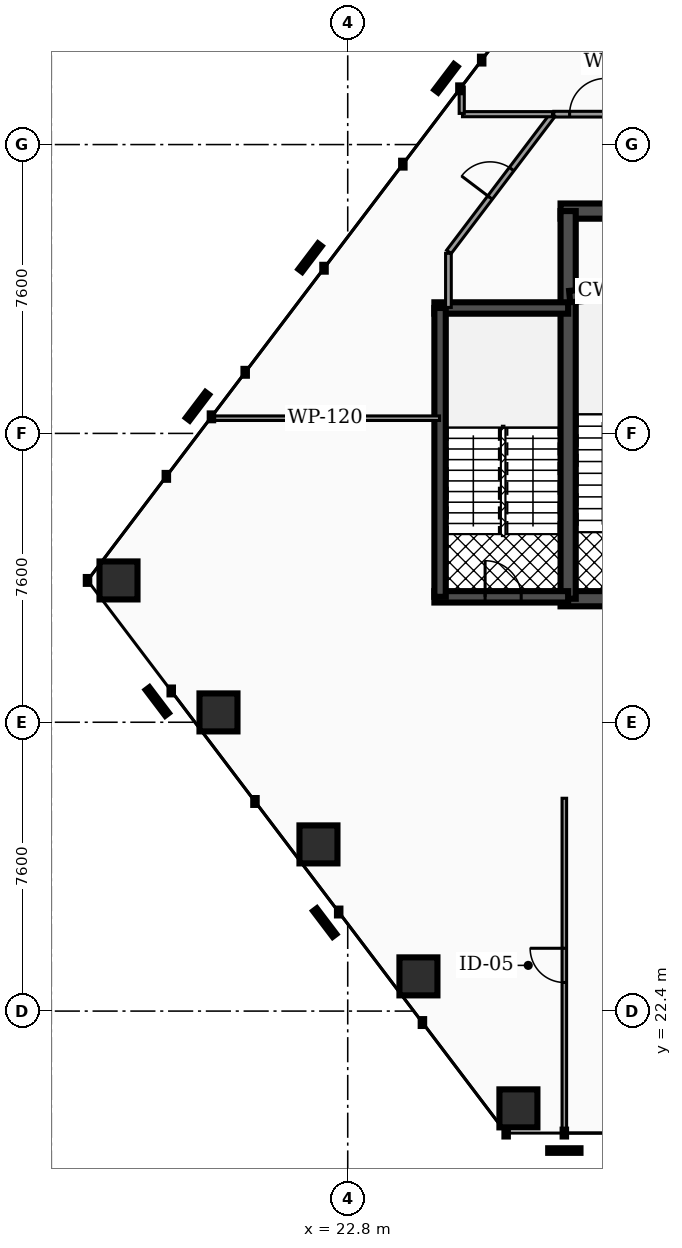
"""IFC4 building model, lengths in metres.
Left out: names, types, materials, properties, quantities, classifications, styles, units other than length and angle.
Written with IfcOpenShell. Run it as: python <this file> out.ifc"""

import sys

from ifc_helpers import new_model, si_unit, direction, frame, frame_2d, origin, origin_2d, place, context, subcontext, project, spatial, rectangle, hollow_rectangle, extrude, element, fill, save


model = new_model("IFC4")
c1 = context("Model", 3, precision=1e-05, world=origin(), true_north=direction((0.0, 1.0)))
c2 = subcontext(c1, "Body", "Model", "MODEL_VIEW")
j1 = project(units=[si_unit("LENGTHUNIT", "METRE"), si_unit("PLANEANGLEUNIT", "RADIAN")], contexts=[c1])
p1 = place(None, origin())
s1 = spatial("IfcSite", under=j1, at=p1, CompositionType="ELEMENT")
p2 = place(p1, origin())
s2 = spatial("IfcBuilding", under=s1, at=p2, CompositionType="ELEMENT")
p3 = place(p2, frame((0.0, 0.0, 27.54)))
s3 = spatial("IfcBuildingStorey", under=s2, at=p3, CompositionType="ELEMENT", Elevation=27.54)
p4 = place(p3, frame((28.4, 43.45, 0.0), z_axis=(0.0, 0.0, 1.0), x_axis=(1.0, 0.0, 0.0)))
e1 = element("IfcWall", 1, at=p4, inside=s3, PredefinedType="SHEAR", context=c2, shape_type="SweptSolid", body=[
    extrude(rectangle(XDim=20.06, YDim=0.4, at=frame_2d((10.03, 0.0))), origin(), (0.0, 0.0, 1.0), 3.82),
])
p5 = place(p3, frame((28.4, 33.25, 0.0), z_axis=(0.0, 0.0, 1.0), x_axis=(1.0, 0.0, 0.0)))
e2 = element("IfcWall", 2, at=p5, inside=s3, PredefinedType="SHEAR", context=c2, shape_type="SweptSolid", body=[
    extrude(rectangle(XDim=20.06, YDim=0.4, at=frame_2d((10.03, 0.0))), origin(), (0.0, 0.0, 1.0), 3.82),
])
p6 = place(p5, frame((4.03, 0.0, 0.0)))
e3 = element("IfcOpeningElement", 3, at=p6, cuts=e2, PredefinedType="OPENING", context=c2, shape_type="SweptSolid", body=[
    extrude(rectangle(XDim=1.1, YDim=2.15, at=frame_2d((0.55, 1.075))), frame((0.0, 0.21, 0.0), z_axis=(0.0, -1.0, 0.0), x_axis=(1.0, 0.0, 0.0)), (0.0, 0.0, 1.0), 0.42),
])
p7 = place(p5, frame((14.87, 0.0, 0.0)))
e4 = element("IfcOpeningElement", 4, at=p7, cuts=e2, PredefinedType="OPENING", context=c2, shape_type="SweptSolid", body=[
    extrude(rectangle(XDim=1.1, YDim=2.15, at=frame_2d((0.55, 1.075))), frame((0.0, 0.21, 0.0), z_axis=(0.0, -1.0, 0.0), x_axis=(1.0, 0.0, 0.0)), (0.0, 0.0, 1.0), 0.42),
])
p8 = place(p5, frame((1.31, 0.0, 0.0)))
e5 = element("IfcOpeningElement", 5, at=p8, cuts=e2, PredefinedType="OPENING", context=c2, shape_type="SweptSolid", body=[
    extrude(rectangle(XDim=1.1, YDim=2.2, at=frame_2d((0.55, 1.1))), frame((0.0, 0.21, 0.0), z_axis=(0.0, -1.0, 0.0), x_axis=(1.0, 0.0, 0.0)), (0.0, 0.0, 1.0), 0.42),
])
p9 = place(p5, frame((9.44, 0.0, 0.0)))
e6 = element("IfcOpeningElement", 6, at=p9, cuts=e2, PredefinedType="OPENING", context=c2, shape_type="SweptSolid", body=[
    extrude(rectangle(XDim=1.12, YDim=2.05, at=frame_2d((0.56, 1.025))), frame((0.0, 0.21, 0.0), z_axis=(0.0, -1.0, 0.0), x_axis=(1.0, 0.0, 0.0)), (0.0, 0.0, 1.0), 0.42),
])
p10 = place(p5, frame((17.65, 0.0, 0.0)))
e7 = element("IfcOpeningElement", 7, at=p10, cuts=e2, PredefinedType="OPENING", context=c2, shape_type="SweptSolid", body=[
    extrude(rectangle(XDim=1.1, YDim=2.2, at=frame_2d((0.55, 1.1))), frame((0.0, 0.21, 0.0), z_axis=(0.0, -1.0, 0.0), x_axis=(1.0, 0.0, 0.0)), (0.0, 0.0, 1.0), 0.42),
])
p11 = place(p3, frame((28.6, 33.25, 0.0), z_axis=(0.0, 0.0, 1.0), x_axis=(0.0, 1.0, 0.0)))
e8 = element("IfcWall", 8, at=p11, inside=s3, PredefinedType="SHEAR", context=c2, shape_type="SweptSolid", body=[
    extrude(rectangle(XDim=10.2, YDim=0.4, at=frame_2d((5.1, 0.0))), origin(), (0.0, 0.0, 1.0), 3.82),
])
p12 = place(p3, frame((28.64, 41.2, 0.0), z_axis=(0.0, 0.0, 1.0), x_axis=(0.995687118776, 0.092774789157, 0.0)))
e9 = element("IfcWall", 9, at=p12, inside=s3, PredefinedType="SHEAR", context=c2, shape_type="SweptSolid", body=[
    extrude(rectangle(XDim=3.234, YDim=0.3, at=frame_2d((1.617, 0.0))), origin(), (0.0, 0.0, 1.0), 3.82),
])
p13 = place(p3, frame((25.08, 40.9, 0.0), z_axis=(0.0, 0.0, 1.0), x_axis=(1.0, 0.0, 0.0)))
e10 = element("IfcWall", 10, at=p13, inside=s3, PredefinedType="SHEAR", context=c2, shape_type="SweptSolid", body=[
    extrude(rectangle(XDim=3.52, YDim=0.3, at=frame_2d((1.76, 0.0))), origin(), (0.0, 0.0, 1.0), 3.82),
])
p14 = place(p3, frame((25.08, 33.3, 0.0), z_axis=(0.0, 0.0, 1.0), x_axis=(1.0, 0.0, 0.0)))
e11 = element("IfcWall", 11, at=p14, inside=s3, PredefinedType="SHEAR", context=c2, shape_type="SweptSolid", body=[
    extrude(rectangle(XDim=3.52, YDim=0.3, at=frame_2d((1.76, 0.0))), origin(), (0.0, 0.0, 1.0), 3.82),
])
p15 = place(p14, frame((1.335, 0.0, 0.0)))
e12 = element("IfcOpeningElement", 12, at=p15, cuts=e11, PredefinedType="OPENING", context=c2, shape_type="SweptSolid", body=[
    extrude(rectangle(XDim=0.95, YDim=2.2, at=frame_2d((0.475, 1.1))), frame((0.0, 0.16, 0.0), z_axis=(0.0, -1.0, 0.0), x_axis=(1.0, 0.0, 0.0)), (0.0, 0.0, 1.0), 0.32),
])
p16 = place(p3, frame((25.23, 33.3, 0.0), z_axis=(0.0, 0.0, 1.0), x_axis=(0.0, 1.0, 0.0)))
e13 = element("IfcWall", 13, at=p16, inside=s3, PredefinedType="SHEAR", context=c2, shape_type="SweptSolid", body=[
    extrude(rectangle(XDim=7.6, YDim=0.3, at=frame_2d((3.8, 0.0))), origin(), (0.0, 0.0, 1.0), 3.82),
])
for number, where, z_axis, x_axis in (
    (14, (16.768, 33.731, 0.0), (0.0, 0.0, 1.0), (1.0, 0.0, 0.0)),
    (15, (19.399, 30.259, 0.0), (0.0, 0.0, 1.0), (1.0, 0.0, 0.0)),
    (16, (22.03, 26.786, 0.0), (0.0, 0.0, 1.0), (1.0, 0.0, 0.0)),
    (17, (24.661, 23.313, 0.0), (0.0, 0.0, 1.0), (1.0, 0.0, 0.0)),
    (18, (27.292, 19.84, 0.0), (0.0, 0.0, 1.0), (1.0, 0.0, 0.0)),
):
    element("IfcColumn", number, at=place(p3, frame(where, z_axis=z_axis, x_axis=x_axis)), inside=s3, PredefinedType="COLUMN", context=c2, shape_type="SweptSolid", body=[
        extrude(hollow_rectangle(XDim=1.0, YDim=1.0, WallThickness=0.05, at=origin_2d()), origin(), (0.0, 0.0, 1.0), 3.82),
    ])
p17 = place(p3, frame((28.223, 46.0, 0.0), z_axis=(0.0, 0.0, 1.0), x_axis=(1.0, 0.0, 0.0)))
e19 = element("IfcWall", 19, at=p17, inside=s3, PredefinedType="PARTITIONING", context=c2, shape_type="SweptSolid", body=[
    extrude(rectangle(XDim=1.772, YDim=0.15, at=frame_2d((0.886, 0.0))), origin(), (0.0, 0.0, 1.0), 2.777),
])
p18 = place(p17, frame((0.416, 0.0, 0.0)))
e20 = element("IfcOpeningElement", 20, at=p18, cuts=e19, PredefinedType="OPENING", context=c2, shape_type="SweptSolid", body=[
    extrude(rectangle(XDim=0.94, YDim=2.05, at=frame_2d((0.47, 1.025))), frame((0.0, 0.085, 0.0), z_axis=(0.0, -1.0, 0.0), x_axis=(1.0, 0.0, 0.0)), (0.0, 0.0, 1.0), 0.17),
])
p19 = place(p3, frame((25.45, 40.915, 0.0), z_axis=(0.0, 0.0, 1.0), x_axis=(0.0, 1.0, 0.0)))
e21 = element("IfcWall", 21, at=p19, inside=s3, PredefinedType="PARTITIONING", context=c2, shape_type="SweptSolid", body=[
    extrude(rectangle(XDim=1.425, YDim=0.15, at=frame_2d((0.712, 0.0))), origin(), (0.0, 0.0, 1.0), 2.777),
])
p20 = place(p3, frame((25.462, 42.375, 0.0), z_axis=(0.0, 0.0, 1.0), x_axis=(0.603832768772, 0.797111025741, 0.0)))
e22 = element("IfcWall", 22, at=p20, inside=s3, PredefinedType="PARTITIONING", context=c2, shape_type="SweptSolid", body=[
    extrude(rectangle(XDim=4.527, YDim=0.15, at=frame_2d((2.264, 0.0))), origin(), (0.0, 0.0, 1.0), 2.777),
])
p21 = place(p20, frame((1.793, 0.0, 0.0)))
e23 = element("IfcOpeningElement", 23, at=p21, cuts=e22, PredefinedType="OPENING", context=c2, shape_type="SweptSolid", body=[
    extrude(rectangle(XDim=0.94, YDim=2.05, at=frame_2d((0.47, 1.025))), frame((0.0, 0.085, 0.0), z_axis=(0.0, -1.0, 0.0), x_axis=(1.0, 0.0, 0.0)), (0.0, 0.0, 1.0), 0.17),
])
p22 = place(p3, frame((25.82, 46.0, 0.0), z_axis=(0.0, 0.0, 1.0), x_axis=(1.0, 0.0, 0.0)))
e24 = element("IfcWall", 24, at=p22, inside=s3, PredefinedType="PARTITIONING", context=c2, shape_type="SweptSolid", body=[
    extrude(rectangle(XDim=2.368, YDim=0.135, at=frame_2d((1.184, 0.0))), origin(), (0.0, 0.0, 1.0), 2.777),
])
p23 = place(p3, frame((25.8, 46.02, 0.0), z_axis=(0.0, 0.0, 1.0), x_axis=(0.0, 1.0, 0.0)))
e25 = element("IfcWall", 25, at=p23, inside=s3, PredefinedType="PARTITIONING", context=c2, shape_type="SweptSolid", body=[
    extrude(rectangle(XDim=0.695, YDim=0.135, at=frame_2d((0.347, 0.0))), origin(), (0.0, 0.0, 1.0), 2.777),
])
p24 = place(p3, frame((28.5, 19.205, 0.0), z_axis=(0.0, 0.0, 1.0), x_axis=(0.0, 1.0, 0.0)))
e26 = element("IfcWall", 26, at=p24, inside=s3, PredefinedType="PARTITIONING", context=c2, shape_type="SweptSolid", body=[
    extrude(rectangle(XDim=8.795, YDim=0.12, at=frame_2d((4.397, 0.0))), origin(), (0.0, 0.0, 1.0), 2.777),
])
p25 = place(p24, frame((3.947, 0.0, 0.0)))
e27 = element("IfcOpeningElement", 27, at=p25, cuts=e26, PredefinedType="OPENING", context=c2, shape_type="SweptSolid", body=[
    extrude(rectangle(XDim=0.9, YDim=2.05, at=frame_2d((0.45, 1.025))), frame((0.0, 0.07, 0.0), z_axis=(0.0, -1.0, 0.0), x_axis=(1.0, 0.0, 0.0)), (0.0, 0.0, 1.0), 0.14),
])
p26 = place(p3, frame((19.201, 38.0, 0.0), z_axis=(0.0, 0.0, 1.0), x_axis=(1.0, 0.0, 0.0)))
e28 = element("IfcWall", 28, at=p26, inside=s3, PredefinedType="PARTITIONING", context=c2, shape_type="SweptSolid", body=[
    extrude(rectangle(XDim=6.014, YDim=0.12, at=frame_2d((3.007, 0.0))), origin(), (0.0, 0.0, 1.0), 2.777),
])
p27 = place(p15, origin())
e29 = element("IfcDoor", 29, at=p27, inside=s3, OperationType="SINGLE_SWING_LEFT", PredefinedType="DOOR", context=c2, shape_type="SweptSolid", body=[
    extrude(rectangle(XDim=0.95, YDim=2.2, at=frame_2d((0.475, 1.1))), frame((0.0, 0.025, 0.0), z_axis=(0.0, -1.0, 0.0), x_axis=(1.0, 0.0, 0.0)), (0.0, 0.0, 1.0), 0.05),
])
fill(e12, e29)
p28 = place(p18, origin())
e30 = element("IfcDoor", 30, at=p28, inside=s3, OperationType="SINGLE_SWING_RIGHT", PredefinedType="DOOR", context=c2, shape_type="SweptSolid", body=[
    extrude(rectangle(XDim=0.94, YDim=2.05, at=frame_2d((0.47, 1.025))), frame((0.0, 0.025, 0.0), z_axis=(0.0, -1.0, 0.0), x_axis=(1.0, 0.0, 0.0)), (0.0, 0.0, 1.0), 0.05),
])
fill(e20, e30)
p29 = place(p21, origin())
e31 = element("IfcDoor", 31, at=p29, inside=s3, OperationType="SINGLE_SWING_LEFT", PredefinedType="DOOR", context=c2, shape_type="SweptSolid", body=[
    extrude(rectangle(XDim=0.94, YDim=2.05, at=frame_2d((0.47, 1.025))), frame((0.0, 0.025, 0.0), z_axis=(0.0, -1.0, 0.0), x_axis=(1.0, 0.0, 0.0)), (0.0, 0.0, 1.0), 0.05),
])
fill(e23, e31)
p30 = place(p25, origin())
e32 = element("IfcDoor", 32, at=p30, inside=s3, OperationType="SINGLE_SWING_RIGHT", PredefinedType="DOOR", context=c2, shape_type="SweptSolid", body=[
    extrude(rectangle(XDim=0.9, YDim=2.05, at=frame_2d((0.45, 1.025))), frame((0.0, 0.025, 0.0), z_axis=(0.0, -1.0, 0.0), x_axis=(1.0, 0.0, 0.0)), (0.0, 0.0, 1.0), 0.05),
])
fill(e27, e32)
save(model, sys.argv[1])
